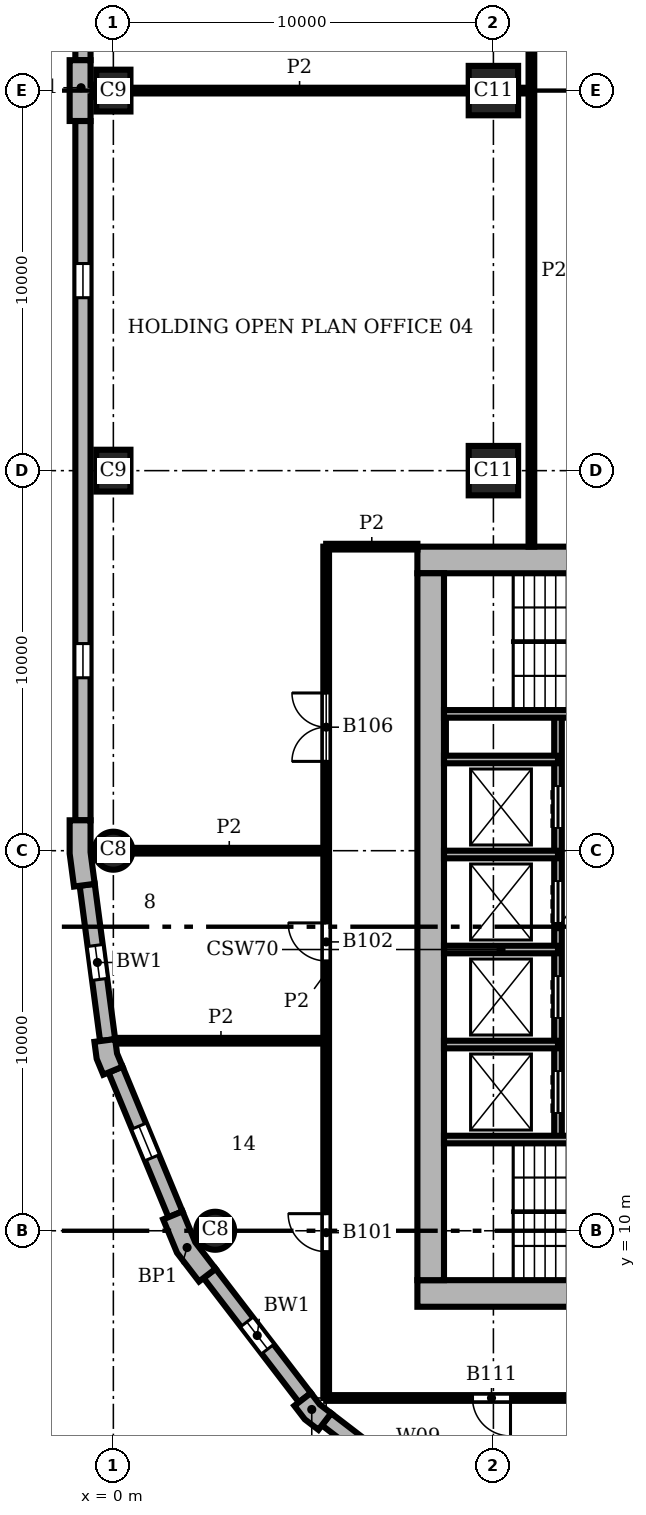
"""IFC4 building model, lengths in metres.
Left out: names, types, materials, properties, quantities, classifications, styles, units other than length and angle.
Written with IfcOpenShell. Run it as: python <this file> out.ifc"""

import sys

from ifc_helpers import new_model, si_unit, direction, frame, frame_2d, origin, origin_2d, place, context, subcontext, project, spatial, polyline, rectangle, circle, outline, extrude, element, fill, save


model = new_model("IFC4")
c1 = context("Model", 3, precision=1e-05, world=origin(), true_north=direction((0.0, 1.0)))
c2 = subcontext(c1, "Body", "Model", "MODEL_VIEW")
j1 = project(units=[si_unit("LENGTHUNIT", "METRE"), si_unit("PLANEANGLEUNIT", "RADIAN")], contexts=[c1])
p1 = place(None, origin())
s1 = spatial("IfcSite", under=j1, at=p1, CompositionType="ELEMENT")
p2 = place(p1, origin())
s2 = spatial("IfcBuilding", under=s1, at=p2, CompositionType="ELEMENT")
p3 = place(p2, frame((0.0, 0.0, 131.7)))
s3 = spatial("IfcBuildingStorey", under=s2, at=p3, CompositionType="ELEMENT", Elevation=131.7)
for number, where, z_axis, x_axis in (
    (1, (0.0, 40.0, 0.0), (0.0, 0.0, 1.0), (0.0, 1.0, 0.0)),
    (2, (0.0, 30.0, 0.0), (0.0, 0.0, 1.0), (0.0, 1.0, 0.0)),
):
    element("IfcColumn", number, at=place(p3, frame(where, z_axis=z_axis, x_axis=x_axis)), inside=s3, PredefinedType="COLUMN", context=c2, shape_type="SweptSolid", body=[
        extrude(rectangle(XDim=1.1, YDim=0.9, at=origin_2d()), origin(), (0.0, 0.0, 1.0), 3.9),
    ])
for number, where, z_axis, x_axis in (
    (3, (0.0, 20.0, 0.0), (0.0, 0.0, 1.0), (1.0, 0.0, 0.0)),
    (4, (2.679, 10.0, 0.0), (0.0, 0.0, 1.0), (1.0, 0.0, 0.0)),
):
    element("IfcColumn", number, at=place(p3, frame(where, z_axis=z_axis, x_axis=x_axis)), inside=s3, PredefinedType="COLUMN", context=c2, shape_type="SweptSolid", body=[
        extrude(circle(Radius=0.5, at=origin_2d()), origin(), (0.0, 0.0, 1.0), 3.9),
    ])
for number, where, z_axis, x_axis in (
    (5, (10.0, 30.0, 0.0), (0.0, 0.0, 1.0), (1.0, 0.0, 0.0)),
    (6, (10.0, 40.0, 0.0), (0.0, 0.0, 1.0), (1.0, 0.0, 0.0)),
):
    element("IfcColumn", number, at=place(p3, frame(where, z_axis=z_axis, x_axis=x_axis)), inside=s3, PredefinedType="COLUMN", context=c2, shape_type="SweptSolid", body=[
        extrude(rectangle(XDim=1.3, YDim=1.3, at=origin_2d()), origin(), (0.0, 0.0, 1.0), 3.9),
    ])
for number, where, z_axis, x_axis in (
    (7, (8.0, 8.35, 0.0), (0.0, 0.0, 1.0), (1.0, 0.0, 0.0)),
    (8, (28.0, 27.65, 0.0), (0.0, 0.0, 1.0), (-1.0, 0.0, 0.0)),
):
    element("IfcWall", number, at=place(p3, frame(where, z_axis=z_axis, x_axis=x_axis)), inside=s3, PredefinedType="SHEAR", context=c2, shape_type="SweptSolid", body=[
        extrude(rectangle(XDim=20.0, YDim=0.7, at=frame_2d((10.0, 0.0))), origin(), (0.0, 0.0, 1.0), 3.9),
    ])
p4 = place(p3, frame((8.35, 27.3, 0.0), z_axis=(0.0, 0.0, 1.0), x_axis=(0.0, -1.0, 0.0)))
e9 = element("IfcWall", 9, at=p4, inside=s3, PredefinedType="SHEAR", context=c2, shape_type="SweptSolid", body=[
    extrude(rectangle(XDim=18.6, YDim=0.7, at=frame_2d((9.3, 0.0))), origin(), (0.0, 0.0, 1.0), 3.9),
])
p5 = place(p3, origin())
e10 = element("IfcWall", 10, at=p5, inside=s3, PredefinedType="SOLIDWALL", context=c2, shape_type="SweptSolid", body=[
    extrude(outline(polyline([(-0.6, 39.2), (-0.6, 39.85), (-0.55, 39.85), (-0.55, 40.15), (-0.6, 40.15), (-0.6, 40.8), (-1.0, 40.8), (-1.15, 40.8), (-1.15, 40.0), (-1.15, 39.2), (-1.0, 39.2), (-0.6, 39.2)])), origin(), (0.0, 0.0, 1.0), 3.9),
])
e11 = element("IfcWall", 11, at=p5, inside=s3, PredefinedType="SOLIDWALL", context=c2, shape_type="SweptSolid", body=[
    extrude(outline(polyline([(-1.0, 20.8), (-1.15, 20.8), (-1.15, 19.925), (-1.036, 19.057), (-0.887, 19.076), (-0.49, 19.128), (-0.6, 19.961), (-0.6, 20.8), (-1.0, 20.8)])), origin(), (0.0, 0.0, 1.0), 3.9),
])
e12 = element("IfcWall", 12, at=p5, inside=s3, PredefinedType="SOLIDWALL", context=c2, shape_type="SweptSolid", body=[
    extrude(outline(polyline([(-0.349, 14.99), (-0.498, 14.971), (-0.439, 14.523), (-0.266, 14.106), (-0.128, 14.164), (0.242, 14.317), (0.097, 14.667), (0.047, 15.043), (-0.349, 14.99)])), origin(), (0.0, 0.0, 1.0), 3.9),
])
e13 = element("IfcWall", 13, at=p5, inside=s3, PredefinedType="SOLIDWALL", context=c2, shape_type="SweptSolid", body=[
    extrude(outline(polyline([(1.449, 10.356), (1.311, 10.299), (1.675, 9.42), (2.254, 8.665), (2.373, 8.757), (2.69, 9.0), (2.155, 9.698), (1.819, 10.51), (1.449, 10.356)])), origin(), (0.0, 0.0, 1.0), 3.9),
])
e14 = element("IfcWall", 14, at=p5, inside=s3, PredefinedType="SOLIDWALL", context=c2, shape_type="SweptSolid", body=[
    extrude(outline(polyline([(4.882, 5.487), (4.763, 5.396), (5.038, 5.038), (5.396, 4.763), (5.487, 4.882), (5.731, 5.199), (5.43, 5.43), (5.199, 5.731), (4.882, 5.487)])), origin(), (0.0, 0.0, 1.0), 3.9),
])
p6 = place(p3, frame((-0.8, 59.2, 0.0), z_axis=(0.0, 0.0, 1.0), x_axis=(0.0, -1.0, 0.0)))
e15 = element("IfcWall", 15, at=p6, inside=s3, PredefinedType="SOLIDWALL", context=c2, shape_type="SweptSolid", body=[
    extrude(rectangle(XDim=18.4, YDim=0.4, at=frame_2d((9.2, 0.0))), origin(), (0.0, 0.0, 1.0), 3.9),
])
p7 = place(p6, frame((3.75, 0.0, 0.9)))
e16 = element("IfcOpeningElement", 16, at=p7, cuts=e15, PredefinedType="OPENING", context=c2, shape_type="SweptSolid", body=[
    extrude(rectangle(XDim=0.9, YDim=2.35, at=frame_2d((0.45, 1.175))), frame((0.0, 0.21, 0.0), z_axis=(0.0, -1.0, 0.0), x_axis=(1.0, 0.0, 0.0)), (0.0, 0.0, 1.0), 0.42),
])
p8 = place(p6, frame((13.75, 0.0, 0.9)))
e17 = element("IfcOpeningElement", 17, at=p8, cuts=e15, PredefinedType="OPENING", context=c2, shape_type="SweptSolid", body=[
    extrude(rectangle(XDim=0.9, YDim=2.35, at=frame_2d((0.45, 1.175))), frame((0.0, 0.21, 0.0), z_axis=(0.0, -1.0, 0.0), x_axis=(1.0, 0.0, 0.0)), (0.0, 0.0, 1.0), 0.42),
])
p9 = place(p3, frame((-0.8, 39.2, 0.0), z_axis=(0.0, 0.0, 1.0), x_axis=(0.0, -1.0, 0.0)))
e18 = element("IfcWall", 18, at=p9, inside=s3, PredefinedType="SOLIDWALL", context=c2, shape_type="SweptSolid", body=[
    extrude(rectangle(XDim=18.4, YDim=0.4, at=frame_2d((9.2, 0.0))), origin(), (0.0, 0.0, 1.0), 3.9),
])
p10 = place(p9, frame((3.75, 0.0, 0.9)))
e19 = element("IfcOpeningElement", 19, at=p10, cuts=e18, PredefinedType="OPENING", context=c2, shape_type="SweptSolid", body=[
    extrude(rectangle(XDim=0.9, YDim=2.35, at=frame_2d((0.45, 1.175))), frame((0.0, 0.21, 0.0), z_axis=(0.0, -1.0, 0.0), x_axis=(1.0, 0.0, 0.0)), (0.0, 0.0, 1.0), 0.42),
])
p11 = place(p9, frame((13.75, 0.0, 0.9)))
e20 = element("IfcOpeningElement", 20, at=p11, cuts=e18, PredefinedType="OPENING", context=c2, shape_type="SweptSolid", body=[
    extrude(rectangle(XDim=0.9, YDim=2.35, at=frame_2d((0.45, 1.175))), frame((0.0, 0.21, 0.0), z_axis=(0.0, -1.0, 0.0), x_axis=(1.0, 0.0, 0.0)), (0.0, 0.0, 1.0), 0.42),
])
p12 = place(p3, frame((-0.689, 19.102, 0.0), z_axis=(0.0, 0.0, 1.0), x_axis=(0.130514280502, -0.991446429508, 0.0)))
e21 = element("IfcWall", 21, at=p12, inside=s3, PredefinedType="SOLIDWALL", context=c2, shape_type="SweptSolid", body=[
    extrude(rectangle(XDim=4.121, YDim=0.4, at=frame_2d((2.061, 0.0))), origin(), (0.0, 0.0, 1.0), 3.9),
])
p13 = place(p12, frame((1.611, 0.0, 0.9)))
e22 = element("IfcOpeningElement", 22, at=p13, cuts=e21, PredefinedType="OPENING", context=c2, shape_type="SweptSolid", body=[
    extrude(rectangle(XDim=0.9, YDim=2.35, at=frame_2d((0.45, 1.175))), frame((0.0, 0.21, 0.0), z_axis=(0.0, -1.0, 0.0), x_axis=(1.0, 0.0, 0.0)), (0.0, 0.0, 1.0), 0.42),
])
p14 = place(p3, frame((0.057, 14.24, 0.0), z_axis=(0.0, 0.0, 1.0), x_axis=(0.382721546029, -0.923863744394, 0.0)))
e23 = element("IfcWall", 23, at=p14, inside=s3, PredefinedType="SOLIDWALL", context=c2, shape_type="SweptSolid", body=[
    extrude(rectangle(XDim=4.121, YDim=0.4, at=frame_2d((2.061, 0.0))), origin(), (0.0, 0.0, 1.0), 3.9),
])
p15 = place(p14, frame((1.611, 0.0, 0.9)))
e24 = element("IfcOpeningElement", 24, at=p15, cuts=e23, PredefinedType="OPENING", context=c2, shape_type="SweptSolid", body=[
    extrude(rectangle(XDim=0.9, YDim=2.35, at=frame_2d((0.45, 1.175))), frame((0.0, 0.21, 0.0), z_axis=(0.0, -1.0, 0.0), x_axis=(1.0, 0.0, 0.0)), (0.0, 0.0, 1.0), 0.42),
])
p16 = place(p3, frame((2.532, 8.878, 0.0), z_axis=(0.0, 0.0, 1.0), x_axis=(0.608759824817, -0.793354571229, 0.0)))
e25 = element("IfcWall", 25, at=p16, inside=s3, PredefinedType="SOLIDWALL", context=c2, shape_type="SweptSolid", body=[
    extrude(rectangle(XDim=4.121, YDim=0.4, at=frame_2d((2.061, 0.0))), origin(), (0.0, 0.0, 1.0), 3.9),
])
p17 = place(p16, frame((1.611, 0.0, 0.9)))
e26 = element("IfcOpeningElement", 26, at=p17, cuts=e25, PredefinedType="OPENING", context=c2, shape_type="SweptSolid", body=[
    extrude(rectangle(XDim=0.9, YDim=2.35, at=frame_2d((0.45, 1.175))), frame((0.0, 0.21, 0.0), z_axis=(0.0, -1.0, 0.0), x_axis=(1.0, 0.0, 0.0)), (0.0, 0.0, 1.0), 0.42),
])
p18 = place(p3, frame((5.609, 5.041, 0.0), z_axis=(0.0, 0.0, 1.0), x_axis=(0.793354571229, -0.608759824817, 0.0)))
e27 = element("IfcWall", 27, at=p18, inside=s3, PredefinedType="SOLIDWALL", context=c2, shape_type="SweptSolid", body=[
    extrude(rectangle(XDim=4.121, YDim=0.4, at=frame_2d((2.061, 0.0))), origin(), (0.0, 0.0, 1.0), 3.9),
])
p19 = place(p18, frame((1.611, 0.0, 0.9)))
e28 = element("IfcOpeningElement", 28, at=p19, cuts=e27, PredefinedType="OPENING", context=c2, shape_type="SweptSolid", body=[
    extrude(rectangle(XDim=0.9, YDim=2.35, at=frame_2d((0.45, 1.175))), frame((0.0, 0.21, 0.0), z_axis=(0.0, -1.0, 0.0), x_axis=(1.0, 0.0, 0.0)), (0.0, 0.0, 1.0), 0.42),
])
p20 = place(p3, frame((8.7, 12.4, 0.0), z_axis=(0.0, 0.0, 1.0), x_axis=(1.0, 0.0, 0.0)))
e29 = element("IfcWall", 29, at=p20, inside=s3, PredefinedType="SHEAR", context=c2, shape_type="SweptSolid", body=[
    extrude(rectangle(XDim=5.1, YDim=0.2, at=frame_2d((2.55, 0.0))), origin(), (0.0, 0.0, 1.0), 3.58),
])
for number, where, z_axis, x_axis in (
    (30, (8.7, 14.9, 0.0), (0.0, 0.0, 1.0), (1.0, 0.0, 0.0)),
    (31, (8.7, 17.4, 0.0), (0.0, 0.0, 1.0), (1.0, 0.0, 0.0)),
    (32, (8.7, 19.9, 0.0), (0.0, 0.0, 1.0), (1.0, 0.0, 0.0)),
    (33, (8.7, 22.4, 0.0), (0.0, 0.0, 1.0), (1.0, 0.0, 0.0)),
):
    element("IfcWall", number, at=place(p3, frame(where, z_axis=z_axis, x_axis=x_axis)), inside=s3, PredefinedType="SHEAR", context=c2, shape_type="SweptSolid", body=[
        extrude(rectangle(XDim=3.0, YDim=0.2, at=frame_2d((1.5, 0.0))), origin(), (0.0, 0.0, 1.0), 3.58),
    ])
p21 = place(p3, frame((8.7, 23.6, 0.0), z_axis=(0.0, 0.0, 1.0), x_axis=(1.0, 0.0, 0.0)))
e34 = element("IfcWall", 34, at=p21, inside=s3, PredefinedType="SHEAR", context=c2, shape_type="SweptSolid", body=[
    extrude(rectangle(XDim=5.1, YDim=0.2, at=frame_2d((2.55, 0.0))), origin(), (0.0, 0.0, 1.0), 3.58),
])
p22 = place(p3, frame((11.7, 12.4, 0.0), z_axis=(0.0, 0.0, 1.0), x_axis=(0.0, 1.0, 0.0)))
e35 = element("IfcWall", 35, at=p22, inside=s3, PredefinedType="SHEAR", context=c2, shape_type="SweptSolid", body=[
    extrude(rectangle(XDim=11.2, YDim=0.2, at=frame_2d((5.6, 0.0))), origin(), (0.0, 0.0, 1.0), 3.58),
])
p23 = place(p22, frame((0.7, 0.0, 0.0)))
e36 = element("IfcOpeningElement", 36, at=p23, cuts=e35, PredefinedType="OPENING", context=c2, shape_type="SweptSolid", body=[
    extrude(rectangle(XDim=1.1, YDim=2.1, at=frame_2d((0.55, 1.05))), frame((0.0, 0.11, 0.0), z_axis=(0.0, -1.0, 0.0), x_axis=(1.0, 0.0, 0.0)), (0.0, 0.0, 1.0), 0.22),
])
p24 = place(p22, frame((3.2, 0.0, 0.0)))
e37 = element("IfcOpeningElement", 37, at=p24, cuts=e35, PredefinedType="OPENING", context=c2, shape_type="SweptSolid", body=[
    extrude(rectangle(XDim=1.1, YDim=2.1, at=frame_2d((0.55, 1.05))), frame((0.0, 0.11, 0.0), z_axis=(0.0, -1.0, 0.0), x_axis=(1.0, 0.0, 0.0)), (0.0, 0.0, 1.0), 0.22),
])
p25 = place(p22, frame((5.7, 0.0, 0.0)))
e38 = element("IfcOpeningElement", 38, at=p25, cuts=e35, PredefinedType="OPENING", context=c2, shape_type="SweptSolid", body=[
    extrude(rectangle(XDim=1.1, YDim=2.1, at=frame_2d((0.55, 1.05))), frame((0.0, 0.11, 0.0), z_axis=(0.0, -1.0, 0.0), x_axis=(1.0, 0.0, 0.0)), (0.0, 0.0, 1.0), 0.22),
])
p26 = place(p22, frame((8.2, 0.0, 0.0)))
e39 = element("IfcOpeningElement", 39, at=p26, cuts=e35, PredefinedType="OPENING", context=c2, shape_type="SweptSolid", body=[
    extrude(rectangle(XDim=1.1, YDim=2.1, at=frame_2d((0.55, 1.05))), frame((0.0, 0.11, 0.0), z_axis=(0.0, -1.0, 0.0), x_axis=(1.0, 0.0, 0.0)), (0.0, 0.0, 1.0), 0.22),
])
p27 = place(p3, frame((5.6, 5.6, 0.0), z_axis=(0.0, 0.0, 1.0), x_axis=(0.0, 1.0, 0.0)))
e40 = element("IfcWall", 40, at=p27, inside=s3, PredefinedType="PARTITIONING", context=c2, shape_type="SweptSolid", body=[
    extrude(rectangle(XDim=22.4, YDim=0.15, at=frame_2d((11.2, 0.0))), origin(), (0.0, 0.0, 1.0), 3.58),
])
p28 = place(p27, frame((3.85, 0.0, 0.0)))
e41 = element("IfcOpeningElement", 41, at=p28, cuts=e40, PredefinedType="OPENING", context=c2, shape_type="SweptSolid", body=[
    extrude(rectangle(XDim=1.0, YDim=2.1, at=frame_2d((0.5, 1.05))), frame((0.0, 0.085, 0.0), z_axis=(0.0, -1.0, 0.0), x_axis=(1.0, 0.0, 0.0)), (0.0, 0.0, 1.0), 0.17),
])
p29 = place(p27, frame((11.5, 0.0, 0.0)))
e42 = element("IfcOpeningElement", 42, at=p29, cuts=e40, PredefinedType="OPENING", context=c2, shape_type="SweptSolid", body=[
    extrude(rectangle(XDim=1.0, YDim=2.1, at=frame_2d((0.5, 1.05))), frame((0.0, 0.085, 0.0), z_axis=(0.0, -1.0, 0.0), x_axis=(1.0, 0.0, 0.0)), (0.0, 0.0, 1.0), 0.17),
])
p30 = place(p27, frame((16.75, 0.0, 0.0)))
e43 = element("IfcOpeningElement", 43, at=p30, cuts=e40, PredefinedType="OPENING", context=c2, shape_type="SweptSolid", body=[
    extrude(rectangle(XDim=1.8, YDim=2.1, at=frame_2d((0.9, 1.05))), frame((0.0, 0.085, 0.0), z_axis=(0.0, -1.0, 0.0), x_axis=(1.0, 0.0, 0.0)), (0.0, 0.0, 1.0), 0.17),
])
p31 = place(p3, frame((11.0, 28.0, 0.0), z_axis=(0.0, 0.0, 1.0), x_axis=(0.0, 1.0, 0.0)))
e44 = element("IfcWall", 44, at=p31, inside=s3, PredefinedType="PARTITIONING", context=c2, shape_type="SweptSolid", body=[
    extrude(rectangle(XDim=14.5, YDim=0.15, at=frame_2d((7.25, 0.0))), origin(), (0.0, 0.0, 1.0), 3.58),
])
p32 = place(p3, frame((5.6, 5.6, 0.0), z_axis=(0.0, 0.0, 1.0), x_axis=(1.0, 0.0, 0.0)))
e45 = element("IfcWall", 45, at=p32, inside=s3, PredefinedType="PARTITIONING", context=c2, shape_type="SweptSolid", body=[
    extrude(rectangle(XDim=25.4, YDim=0.15, at=frame_2d((12.7, 0.0))), origin(), (0.0, 0.0, 1.0), 3.58),
])
p33 = place(p32, frame((3.85, 0.0, 0.0)))
e46 = element("IfcOpeningElement", 46, at=p33, cuts=e45, PredefinedType="OPENING", context=c2, shape_type="SweptSolid", body=[
    extrude(rectangle(XDim=1.0, YDim=2.1, at=frame_2d((0.5, 1.05))), frame((0.0, 0.085, 0.0), z_axis=(0.0, -1.0, 0.0), x_axis=(1.0, 0.0, 0.0)), (0.0, 0.0, 1.0), 0.17),
])
p34 = place(p32, frame((12.0, 0.0, 0.0)))
e47 = element("IfcOpeningElement", 47, at=p34, cuts=e45, PredefinedType="OPENING", context=c2, shape_type="SweptSolid", body=[
    extrude(rectangle(XDim=1.0, YDim=2.1, at=frame_2d((0.5, 1.05))), frame((0.0, 0.085, 0.0), z_axis=(0.0, -1.0, 0.0), x_axis=(1.0, 0.0, 0.0)), (0.0, 0.0, 1.0), 0.17),
])
p35 = place(p32, frame((19.25, 0.0, 0.0)))
e48 = element("IfcOpeningElement", 48, at=p35, cuts=e45, PredefinedType="OPENING", context=c2, shape_type="SweptSolid", body=[
    extrude(rectangle(XDim=1.0, YDim=2.1, at=frame_2d((0.5, 1.05))), frame((0.0, 0.085, 0.0), z_axis=(0.0, -1.0, 0.0), x_axis=(1.0, 0.0, 0.0)), (0.0, 0.0, 1.0), 0.17),
])
p36 = place(p3, frame((0.063, 15.0, 0.0), z_axis=(0.0, 0.0, 1.0), x_axis=(1.0, 0.0, 0.0)))
e49 = element("IfcWall", 49, at=p36, inside=s3, PredefinedType="PARTITIONING", context=c2, shape_type="SweptSolid", body=[
    extrude(rectangle(XDim=5.537, YDim=0.15, at=frame_2d((2.769, 0.0))), origin(), (0.0, 0.0, 1.0), 3.58),
])
p37 = place(p3, frame((0.5, 20.0, 0.0), z_axis=(0.0, 0.0, 1.0), x_axis=(1.0, 0.0, 0.0)))
e50 = element("IfcWall", 50, at=p37, inside=s3, PredefinedType="PARTITIONING", context=c2, shape_type="SweptSolid", body=[
    extrude(rectangle(XDim=5.1, YDim=0.15, at=frame_2d((2.55, 0.0))), origin(), (0.0, 0.0, 1.0), 3.58),
])
p38 = place(p3, frame((5.6, 28.0, 0.0), z_axis=(0.0, 0.0, 1.0), x_axis=(1.0, 0.0, 0.0)))
e51 = element("IfcWall", 51, at=p38, inside=s3, PredefinedType="PARTITIONING", context=c2, shape_type="SweptSolid", body=[
    extrude(rectangle(XDim=2.4, YDim=0.15, at=frame_2d((1.2, 0.0))), origin(), (0.0, 0.0, 1.0), 3.58),
])
p39 = place(p3, frame((0.45, 40.0, 0.0), z_axis=(0.0, 0.0, 1.0), x_axis=(1.0, 0.0, 0.0)))
e52 = element("IfcWall", 52, at=p39, inside=s3, PredefinedType="PARTITIONING", context=c2, shape_type="SweptSolid", body=[
    extrude(rectangle(XDim=8.9, YDim=0.15, at=frame_2d((4.45, 0.0))), origin(), (0.0, 0.0, 1.0), 3.58),
])
p40 = place(p3, frame((10.65, 40.0, 0.0), z_axis=(0.0, 0.0, 1.0), x_axis=(1.0, 0.0, 0.0)))
e53 = element("IfcWall", 53, at=p40, inside=s3, PredefinedType="PARTITIONING", context=c2, shape_type="SweptSolid", body=[
    extrude(rectangle(XDim=0.35, YDim=0.15, at=frame_2d((0.175, 0.0))), origin(), (0.0, 0.0, 1.0), 3.58),
])
p41 = place(p10, origin())
e54 = element("IfcWindow", 54, at=p41, inside=s3, PartitioningType="SINGLE_PANEL", PredefinedType="WINDOW", context=c2, shape_type="SweptSolid", body=[
    extrude(rectangle(XDim=0.9, YDim=2.35, at=frame_2d((0.45, 1.175))), frame((0.0, 0.16, 0.0), z_axis=(0.0, -1.0, 0.0), x_axis=(1.0, 0.0, 0.0)), (0.0, 0.0, 1.0), 0.06),
])
fill(e19, e54)
p42 = place(p11, origin())
e55 = element("IfcWindow", 55, at=p42, inside=s3, PartitioningType="SINGLE_PANEL", PredefinedType="WINDOW", context=c2, shape_type="SweptSolid", body=[
    extrude(rectangle(XDim=0.9, YDim=2.35, at=frame_2d((0.45, 1.175))), frame((0.0, 0.16, 0.0), z_axis=(0.0, -1.0, 0.0), x_axis=(1.0, 0.0, 0.0)), (0.0, 0.0, 1.0), 0.06),
])
fill(e20, e55)
p43 = place(p13, origin())
e56 = element("IfcWindow", 56, at=p43, inside=s3, PartitioningType="SINGLE_PANEL", PredefinedType="WINDOW", context=c2, shape_type="SweptSolid", body=[
    extrude(rectangle(XDim=0.9, YDim=2.35, at=frame_2d((0.45, 1.175))), frame((0.0, 0.16, 0.0), z_axis=(0.0, -1.0, 0.0), x_axis=(1.0, 0.0, 0.0)), (0.0, 0.0, 1.0), 0.06),
])
fill(e22, e56)
p44 = place(p15, origin())
e57 = element("IfcWindow", 57, at=p44, inside=s3, PartitioningType="SINGLE_PANEL", PredefinedType="WINDOW", context=c2, shape_type="SweptSolid", body=[
    extrude(rectangle(XDim=0.9, YDim=2.35, at=frame_2d((0.45, 1.175))), frame((0.0, 0.16, 0.0), z_axis=(0.0, -1.0, 0.0), x_axis=(1.0, 0.0, 0.0)), (0.0, 0.0, 1.0), 0.06),
])
fill(e24, e57)
p45 = place(p17, origin())
e58 = element("IfcWindow", 58, at=p45, inside=s3, PartitioningType="SINGLE_PANEL", PredefinedType="WINDOW", context=c2, shape_type="SweptSolid", body=[
    extrude(rectangle(XDim=0.9, YDim=2.35, at=frame_2d((0.45, 1.175))), frame((0.0, 0.16, 0.0), z_axis=(0.0, -1.0, 0.0), x_axis=(1.0, 0.0, 0.0)), (0.0, 0.0, 1.0), 0.06),
])
fill(e26, e58)
p46 = place(p23, origin())
e59 = element("IfcDoor", 59, at=p46, inside=s3, OperationType="DOUBLE_DOOR_SLIDING", PredefinedType="DOOR", context=c2, shape_type="SweptSolid", body=[
    extrude(rectangle(XDim=1.1, YDim=2.1, at=frame_2d((0.55, 1.05))), frame((0.0, 0.025, 0.0), z_axis=(0.0, -1.0, 0.0), x_axis=(1.0, 0.0, 0.0)), (0.0, 0.0, 1.0), 0.05),
])
fill(e36, e59)
p47 = place(p24, origin())
e60 = element("IfcDoor", 60, at=p47, inside=s3, OperationType="DOUBLE_DOOR_SLIDING", PredefinedType="DOOR", context=c2, shape_type="SweptSolid", body=[
    extrude(rectangle(XDim=1.1, YDim=2.1, at=frame_2d((0.55, 1.05))), frame((0.0, 0.025, 0.0), z_axis=(0.0, -1.0, 0.0), x_axis=(1.0, 0.0, 0.0)), (0.0, 0.0, 1.0), 0.05),
])
fill(e37, e60)
p48 = place(p25, origin())
e61 = element("IfcDoor", 61, at=p48, inside=s3, OperationType="DOUBLE_DOOR_SLIDING", PredefinedType="DOOR", context=c2, shape_type="SweptSolid", body=[
    extrude(rectangle(XDim=1.1, YDim=2.1, at=frame_2d((0.55, 1.05))), frame((0.0, 0.025, 0.0), z_axis=(0.0, -1.0, 0.0), x_axis=(1.0, 0.0, 0.0)), (0.0, 0.0, 1.0), 0.05),
])
fill(e38, e61)
p49 = place(p26, origin())
e62 = element("IfcDoor", 62, at=p49, inside=s3, OperationType="DOUBLE_DOOR_SLIDING", PredefinedType="DOOR", context=c2, shape_type="SweptSolid", body=[
    extrude(rectangle(XDim=1.1, YDim=2.1, at=frame_2d((0.55, 1.05))), frame((0.0, 0.025, 0.0), z_axis=(0.0, -1.0, 0.0), x_axis=(1.0, 0.0, 0.0)), (0.0, 0.0, 1.0), 0.05),
])
fill(e39, e62)
p50 = place(p28, origin())
e63 = element("IfcDoor", 63, at=p50, inside=s3, OperationType="SINGLE_SWING_RIGHT", PredefinedType="DOOR", context=c2, shape_type="SweptSolid", body=[
    extrude(rectangle(XDim=1.0, YDim=2.1, at=frame_2d((0.5, 1.05))), frame((0.0, 0.025, 0.0), z_axis=(0.0, -1.0, 0.0), x_axis=(1.0, 0.0, 0.0)), (0.0, 0.0, 1.0), 0.05),
])
fill(e41, e63)
p51 = place(p29, origin())
e64 = element("IfcDoor", 64, at=p51, inside=s3, OperationType="SINGLE_SWING_RIGHT", PredefinedType="DOOR", context=c2, shape_type="SweptSolid", body=[
    extrude(rectangle(XDim=1.0, YDim=2.1, at=frame_2d((0.5, 1.05))), frame((0.0, 0.025, 0.0), z_axis=(0.0, -1.0, 0.0), x_axis=(1.0, 0.0, 0.0)), (0.0, 0.0, 1.0), 0.05),
])
fill(e42, e64)
p52 = place(p30, origin())
e65 = element("IfcDoor", 65, at=p52, inside=s3, OperationType="DOUBLE_DOOR_SINGLE_SWING", PredefinedType="DOOR", context=c2, shape_type="SweptSolid", body=[
    extrude(rectangle(XDim=1.8, YDim=2.1, at=frame_2d((0.9, 1.05))), frame((0.0, 0.025, 0.0), z_axis=(0.0, -1.0, 0.0), x_axis=(1.0, 0.0, 0.0)), (0.0, 0.0, 1.0), 0.05),
])
fill(e43, e65)
p53 = place(p33, frame((1.0, 0.0, 0.0), z_axis=(0.0, 0.0, 1.0), x_axis=(-1.0, 0.0, 0.0)))
e66 = element("IfcDoor", 66, at=p53, inside=s3, OperationType="SINGLE_SWING_LEFT", PredefinedType="DOOR", context=c2, shape_type="SweptSolid", body=[
    extrude(rectangle(XDim=1.0, YDim=2.1, at=frame_2d((0.5, 1.05))), frame((0.0, 0.025, 0.0), z_axis=(0.0, -1.0, 0.0), x_axis=(1.0, 0.0, 0.0)), (0.0, 0.0, 1.0), 0.05),
])
fill(e46, e66)
save(model, sys.argv[1])
